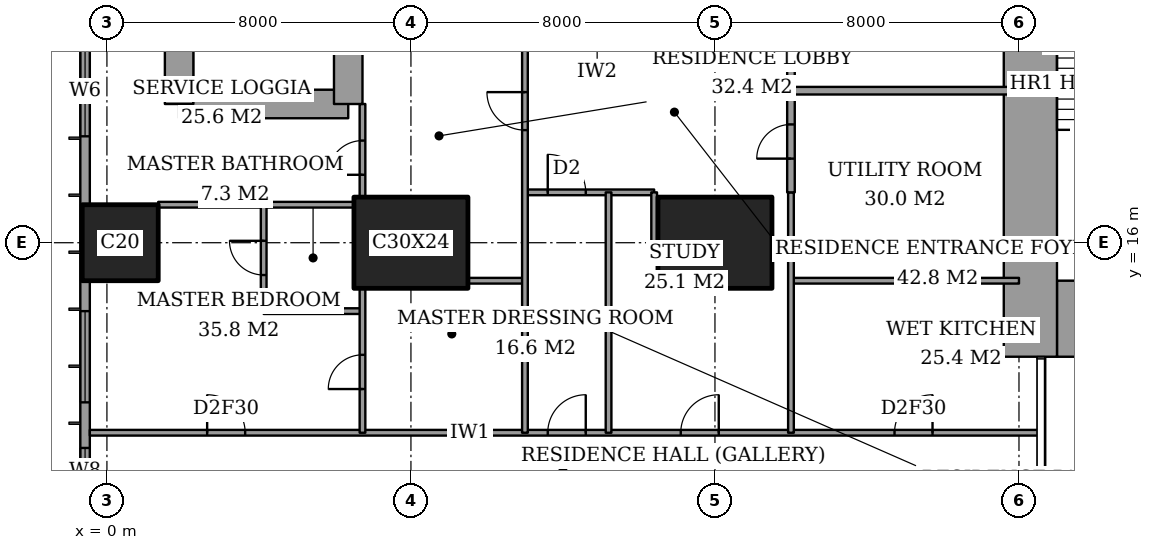
"""IFC4 building model, lengths in metres.
Left out: names, types, materials, properties, quantities, classifications, styles, units other than length and angle.
Written with IfcOpenShell. Run it as: python <this file> out.ifc"""

import sys

from ifc_helpers import new_model, si_unit, direction, frame, frame_2d, origin, origin_2d, place, context, subcontext, project, spatial, rectangle, extrude, element, fill, save


model = new_model("IFC4")
c1 = context("Model", 3, precision=1e-05, world=origin(), true_north=direction((0.0, 1.0)))
c2 = subcontext(c1, "Body", "Model", "MODEL_VIEW")
j1 = project(units=[si_unit("LENGTHUNIT", "METRE"), si_unit("PLANEANGLEUNIT", "RADIAN")], contexts=[c1])
p1 = place(None, origin())
s1 = spatial("IfcSite", under=j1, at=p1, CompositionType="ELEMENT")
p2 = place(p1, origin())
s2 = spatial("IfcBuilding", under=s1, at=p2, CompositionType="ELEMENT")
p3 = place(p2, frame((0.0, 0.0, 72.8)))
s3 = spatial("IfcBuildingStorey", under=s2, at=p3, CompositionType="ELEMENT", Elevation=72.8)
p4 = place(p3, frame((0.35, 16.0, 0.0), z_axis=(0.0, 0.0, 1.0), x_axis=(1.0, 0.0, 0.0)))
e1 = element("IfcColumn", 1, at=p4, inside=s3, PredefinedType="COLUMN", context=c2, shape_type="SweptSolid", body=[
    extrude(rectangle(XDim=2.0, YDim=2.0, at=origin_2d()), origin(), (0.0, 0.0, 1.0), 3.6),
])
for number, where, z_axis, x_axis in (
    (2, (8.0, 16.0, 0.0), (0.0, 0.0, 1.0), (1.0, 0.0, 0.0)),
    (3, (16.0, 16.0, 0.0), (0.0, 0.0, 1.0), (1.0, 0.0, 0.0)),
):
    element("IfcColumn", number, at=place(p3, frame(where, z_axis=z_axis, x_axis=x_axis)), inside=s3, PredefinedType="COLUMN", context=c2, shape_type="SweptSolid", body=[
        extrude(rectangle(XDim=3.0, YDim=2.4, at=origin_2d()), origin(), (0.0, 0.0, 1.0), 3.6),
    ])
p5 = place(p3, frame((25.0, 14.0, 0.0), z_axis=(0.0, 0.0, 1.0), x_axis=(1.0, 0.0, 0.0)))
e4 = element("IfcWall", 4, at=p5, inside=s3, PredefinedType="SHEAR", context=c2, shape_type="SweptSolid", body=[
    extrude(rectangle(XDim=3.15, YDim=2.0, at=frame_2d((1.575, 0.0))), origin(), (0.0, 0.0, 1.0), 3.6),
])
p6 = place(p3, frame((24.3, 13.0, 0.0), z_axis=(0.0, 0.0, 1.0), x_axis=(0.0, 1.0, 0.0)))
e5 = element("IfcWall", 5, at=p6, inside=s3, PredefinedType="SHEAR", context=c2, shape_type="SweptSolid", body=[
    extrude(rectangle(XDim=10.15, YDim=1.4, at=frame_2d((5.075, 0.0))), origin(), (0.0, 0.0, 1.0), 3.6),
])
p7 = place(p3, frame((1.9, 19.65, 0.0), z_axis=(0.0, 0.0, 1.0), x_axis=(1.0, 0.0, 0.0)))
e6 = element("IfcWall", 6, at=p7, inside=s3, PredefinedType="SHEAR", context=c2, shape_type="SweptSolid", body=[
    extrude(rectangle(XDim=4.45, YDim=0.75, at=frame_2d((2.225, 0.0))), origin(), (0.0, 0.0, 1.0), 3.6),
])
p8 = place(p3, frame((6.35, 19.65, 0.0), z_axis=(0.0, 0.0, 1.0), x_axis=(0.0, 1.0, 0.0)))
e7 = element("IfcWall", 7, at=p8, inside=s3, PredefinedType="SHEAR", context=c2, shape_type="SweptSolid", body=[
    extrude(rectangle(XDim=8.7, YDim=0.75, at=frame_2d((4.35, 0.0))), origin(), (0.0, 0.0, 1.0), 3.6),
])
p9 = place(p8, frame((6.725, 0.0, 0.0)))
e8 = element("IfcOpeningElement", 8, at=p9, cuts=e7, PredefinedType="OPENING", context=c2, shape_type="SweptSolid", body=[
    extrude(rectangle(XDim=1.0, YDim=2.1, at=frame_2d((0.5, 1.05))), frame((0.0, 0.385, 0.0), z_axis=(0.0, -1.0, 0.0), x_axis=(1.0, 0.0, 0.0)), (0.0, 0.0, 1.0), 0.77),
])
p10 = place(p3, frame((1.9, 28.35, 0.0), z_axis=(0.0, 0.0, 1.0), x_axis=(0.0, -1.0, 0.0)))
e9 = element("IfcWall", 9, at=p10, inside=s3, PredefinedType="SHEAR", context=c2, shape_type="SweptSolid", body=[
    extrude(rectangle(XDim=8.7, YDim=0.75, at=frame_2d((4.35, 0.0))), origin(), (0.0, 0.0, 1.0), 3.6),
])
p11 = place(p3, frame((-0.575, 44.825, 0.0), z_axis=(0.0, 0.0, 1.0), x_axis=(0.0, -1.0, 0.0)))
e10 = element("IfcWall", 10, at=p11, inside=s3, PredefinedType="SOLIDWALL", context=c2, shape_type="SweptSolid", body=[
    extrude(rectangle(XDim=41.65, YDim=0.25, at=frame_2d((20.825, 0.0))), origin(), (0.0, 0.0, 1.0), 3.6),
])
p12 = place(p11, frame((0.775, 0.0, 0.6)))
e11 = element("IfcOpeningElement", 11, at=p12, cuts=e10, PredefinedType="OPENING", context=c2, shape_type="SweptSolid", body=[
    extrude(rectangle(XDim=2.4, YDim=2.0, at=frame_2d((1.2, 1.0))), frame((0.0, 0.135, 0.0), z_axis=(0.0, -1.0, 0.0), x_axis=(1.0, 0.0, 0.0)), (0.0, 0.0, 1.0), 0.27),
])
p13 = place(p11, frame((6.1, 0.0, 0.6)))
e12 = element("IfcOpeningElement", 12, at=p13, cuts=e10, PredefinedType="OPENING", context=c2, shape_type="SweptSolid", body=[
    extrude(rectangle(XDim=1.2, YDim=2.0, at=frame_2d((0.6, 1.0))), frame((0.0, 0.135, 0.0), z_axis=(0.0, -1.0, 0.0), x_axis=(1.0, 0.0, 0.0)), (0.0, 0.0, 1.0), 0.27),
])
p14 = place(p11, frame((8.425, 0.0, 0.6)))
e13 = element("IfcOpeningElement", 13, at=p14, cuts=e10, PredefinedType="OPENING", context=c2, shape_type="SweptSolid", body=[
    extrude(rectangle(XDim=2.4, YDim=2.0, at=frame_2d((1.2, 1.0))), frame((0.0, 0.135, 0.0), z_axis=(0.0, -1.0, 0.0), x_axis=(1.0, 0.0, 0.0)), (0.0, 0.0, 1.0), 0.27),
])
p15 = place(p11, frame((15.625, 0.0, 0.6)))
e14 = element("IfcOpeningElement", 14, at=p15, cuts=e10, PredefinedType="OPENING", context=c2, shape_type="SweptSolid", body=[
    extrude(rectangle(XDim=2.4, YDim=2.0, at=frame_2d((1.2, 1.0))), frame((0.0, 0.135, 0.0), z_axis=(0.0, -1.0, 0.0), x_axis=(1.0, 0.0, 0.0)), (0.0, 0.0, 1.0), 0.27),
])
p16 = place(p11, frame((23.625, 0.0, 0.6)))
e15 = element("IfcOpeningElement", 15, at=p16, cuts=e10, PredefinedType="OPENING", context=c2, shape_type="SweptSolid", body=[
    extrude(rectangle(XDim=2.4, YDim=2.0, at=frame_2d((1.2, 1.0))), frame((0.0, 0.135, 0.0), z_axis=(0.0, -1.0, 0.0), x_axis=(1.0, 0.0, 0.0)), (0.0, 0.0, 1.0), 0.27),
])
p17 = place(p11, frame((30.625, 0.0, 0.6)))
e16 = element("IfcOpeningElement", 16, at=p17, cuts=e10, PredefinedType="OPENING", context=c2, shape_type="SweptSolid", body=[
    extrude(rectangle(XDim=2.4, YDim=2.0, at=frame_2d((1.2, 1.0))), frame((0.0, 0.135, 0.0), z_axis=(0.0, -1.0, 0.0), x_axis=(1.0, 0.0, 0.0)), (0.0, 0.0, 1.0), 0.27),
])
p18 = place(p11, frame((34.225, 0.0, 0.6)))
e17 = element("IfcOpeningElement", 17, at=p18, cuts=e10, PredefinedType="OPENING", context=c2, shape_type="SweptSolid", body=[
    extrude(rectangle(XDim=1.2, YDim=2.0, at=frame_2d((0.6, 1.0))), frame((0.0, 0.135, 0.0), z_axis=(0.0, -1.0, 0.0), x_axis=(1.0, 0.0, 0.0)), (0.0, 0.0, 1.0), 0.27),
])
p19 = place(p11, frame((38.475, 0.0, 0.6)))
e18 = element("IfcOpeningElement", 18, at=p19, cuts=e10, PredefinedType="OPENING", context=c2, shape_type="SweptSolid", body=[
    extrude(rectangle(XDim=2.4, YDim=2.0, at=frame_2d((1.2, 1.0))), frame((0.0, 0.135, 0.0), z_axis=(0.0, -1.0, 0.0), x_axis=(1.0, 0.0, 0.0)), (0.0, 0.0, 1.0), 0.27),
])
p20 = place(p3, frame((-0.45, 11.0, 0.0), z_axis=(0.0, 0.0, 1.0), x_axis=(1.0, 0.0, 0.0)))
e19 = element("IfcWall", 19, at=p20, inside=s3, PredefinedType="PARTITIONING", context=c2, shape_type="SweptSolid", body=[
    extrude(rectangle(XDim=25.011, YDim=0.15, at=frame_2d((12.505, 0.0))), origin(), (0.0, 0.0, 1.0), 3.35),
])
p21 = place(p20, frame((12.05, 0.0, 0.0)))
e20 = element("IfcOpeningElement", 20, at=p21, cuts=e19, PredefinedType="OPENING", context=c2, shape_type="SweptSolid", body=[
    extrude(rectangle(XDim=1.0, YDim=2.1, at=frame_2d((0.5, 1.05))), frame((0.0, 0.085, 0.0), z_axis=(0.0, -1.0, 0.0), x_axis=(1.0, 0.0, 0.0)), (0.0, 0.0, 1.0), 0.17),
])
p22 = place(p20, frame((3.087, 0.0, 0.0)))
e21 = element("IfcOpeningElement", 21, at=p22, cuts=e19, PredefinedType="OPENING", context=c2, shape_type="SweptSolid", body=[
    extrude(rectangle(XDim=1.0, YDim=2.1, at=frame_2d((0.5, 1.05))), frame((0.0, 0.085, 0.0), z_axis=(0.0, -1.0, 0.0), x_axis=(1.0, 0.0, 0.0)), (0.0, 0.0, 1.0), 0.17),
])
p23 = place(p20, frame((15.55, 0.0, 0.0)))
e22 = element("IfcOpeningElement", 22, at=p23, cuts=e19, PredefinedType="OPENING", context=c2, shape_type="SweptSolid", body=[
    extrude(rectangle(XDim=1.0, YDim=2.1, at=frame_2d((0.5, 1.05))), frame((0.0, 0.085, 0.0), z_axis=(0.0, -1.0, 0.0), x_axis=(1.0, 0.0, 0.0)), (0.0, 0.0, 1.0), 0.17),
])
p24 = place(p20, frame((21.175, 0.0, 0.0)))
e23 = element("IfcOpeningElement", 23, at=p24, cuts=e19, PredefinedType="OPENING", context=c2, shape_type="SweptSolid", body=[
    extrude(rectangle(XDim=1.0, YDim=2.1, at=frame_2d((0.5, 1.05))), frame((0.0, 0.085, 0.0), z_axis=(0.0, -1.0, 0.0), x_axis=(1.0, 0.0, 0.0)), (0.0, 0.0, 1.0), 0.17),
])
p25 = place(p3, frame((4.125, 14.2, 0.0), z_axis=(0.0, 0.0, 1.0), x_axis=(1.0, 0.0, 0.0)))
e24 = element("IfcWall", 24, at=p25, inside=s3, PredefinedType="PARTITIONING", context=c2, shape_type="SweptSolid", body=[
    extrude(rectangle(XDim=2.6, YDim=0.15, at=frame_2d((1.3, 0.0))), origin(), (0.0, 0.0, 1.0), 3.35),
])
p26 = place(p3, frame((9.5, 15.0, 0.0), z_axis=(0.0, 0.0, 1.0), x_axis=(1.0, 0.0, 0.0)))
e25 = element("IfcWall", 25, at=p26, inside=s3, PredefinedType="PARTITIONING", context=c2, shape_type="SweptSolid", body=[
    extrude(rectangle(XDim=1.5, YDim=0.15, at=frame_2d((0.75, 0.0))), origin(), (0.0, 0.0, 1.0), 3.35),
])
p27 = place(p3, frame((18.0, 15.0, 0.0), z_axis=(0.0, 0.0, 1.0), x_axis=(1.0, 0.0, 0.0)))
e26 = element("IfcWall", 26, at=p27, inside=s3, PredefinedType="PARTITIONING", context=c2, shape_type="SweptSolid", body=[
    extrude(rectangle(XDim=6.0, YDim=0.15, at=frame_2d((3.0, 0.0))), origin(), (0.0, 0.0, 1.0), 3.35),
])
p28 = place(p3, frame((17.5, 15.875, 0.0), z_axis=(0.0, 0.0, 1.0), x_axis=(1.0, 0.0, 0.0)))
e27 = element("IfcWall", 27, at=p28, inside=s3, PredefinedType="PARTITIONING", context=c2, shape_type="SweptSolid", body=[
    extrude(rectangle(XDim=0.5, YDim=0.15, at=frame_2d((0.25, 0.0))), origin(), (0.0, 0.0, 1.0), 2.634),
])
p29 = place(p3, frame((1.35, 17.0, 0.0), z_axis=(0.0, 0.0, 1.0), x_axis=(1.0, 0.0, 0.0)))
e28 = element("IfcWall", 28, at=p29, inside=s3, PredefinedType="PARTITIONING", context=c2, shape_type="SweptSolid", body=[
    extrude(rectangle(XDim=5.15, YDim=0.15, at=frame_2d((2.575, 0.0))), origin(), (0.0, 0.0, 1.0), 3.35),
])
p30 = place(p3, frame((11.0, 17.325, 0.0), z_axis=(0.0, 0.0, 1.0), x_axis=(1.0, 0.0, 0.0)))
e29 = element("IfcWall", 29, at=p30, inside=s3, PredefinedType="PARTITIONING", context=c2, shape_type="SweptSolid", body=[
    extrude(rectangle(XDim=3.4, YDim=0.15, at=frame_2d((1.7, 0.0))), origin(), (0.0, 0.0, 1.0), 3.35),
])
p31 = place(p30, frame((0.6, 0.0, 0.0)))
e30 = element("IfcOpeningElement", 30, at=p31, cuts=e29, PredefinedType="OPENING", context=c2, shape_type="SweptSolid", body=[
    extrude(rectangle(XDim=1.0, YDim=2.1, at=frame_2d((0.5, 1.05))), frame((0.0, 0.085, 0.0), z_axis=(0.0, -1.0, 0.0), x_axis=(1.0, 0.0, 0.0)), (0.0, 0.0, 1.0), 0.17),
])
p32 = place(p3, frame((18.0, 20.0, 0.0), z_axis=(0.0, 0.0, 1.0), x_axis=(1.0, 0.0, 0.0)))
e31 = element("IfcWall", 31, at=p32, inside=s3, PredefinedType="PARTITIONING", context=c2, shape_type="SweptSolid", body=[
    extrude(rectangle(XDim=6.0, YDim=0.2, at=frame_2d((3.0, 0.0))), origin(), (0.0, 0.0, 1.0), 3.35),
])
p33 = place(p3, frame((4.125, 14.2, 0.0), z_axis=(0.0, 0.0, 1.0), x_axis=(0.0, 1.0, 0.0)))
e32 = element("IfcWall", 32, at=p33, inside=s3, PredefinedType="PARTITIONING", context=c2, shape_type="SweptSolid", body=[
    extrude(rectangle(XDim=2.8, YDim=0.15, at=frame_2d((1.4, 0.0))), origin(), (0.0, 0.0, 1.0), 3.35),
])
p34 = place(p33, frame((0.95, 0.0, 0.0)))
e33 = element("IfcOpeningElement", 33, at=p34, cuts=e32, PredefinedType="OPENING", context=c2, shape_type="SweptSolid", body=[
    extrude(rectangle(XDim=0.9, YDim=2.1, at=frame_2d((0.45, 1.05))), frame((0.0, 0.085, 0.0), z_axis=(0.0, -1.0, 0.0), x_axis=(1.0, 0.0, 0.0)), (0.0, 0.0, 1.0), 0.17),
])
p35 = place(p3, frame((6.725, 11.0, 0.0), z_axis=(0.0, 0.0, 1.0), x_axis=(0.0, 1.0, 0.0)))
e34 = element("IfcWall", 34, at=p35, inside=s3, PredefinedType="PARTITIONING", context=c2, shape_type="SweptSolid", body=[
    extrude(rectangle(XDim=3.8, YDim=0.15, at=frame_2d((1.9, 0.0))), origin(), (0.0, 0.0, 1.0), 3.35),
])
p36 = place(p35, frame((1.15, 0.0, 0.0)))
e35 = element("IfcOpeningElement", 35, at=p36, cuts=e34, PredefinedType="OPENING", context=c2, shape_type="SweptSolid", body=[
    extrude(rectangle(XDim=0.9, YDim=2.1, at=frame_2d((0.45, 1.05))), frame((0.0, 0.085, 0.0), z_axis=(0.0, -1.0, 0.0), x_axis=(1.0, 0.0, 0.0)), (0.0, 0.0, 1.0), 0.17),
])
p37 = place(p3, frame((6.725, 17.2, 0.0), z_axis=(0.0, 0.0, 1.0), x_axis=(0.0, 1.0, 0.0)))
e36 = element("IfcWall", 36, at=p37, inside=s3, PredefinedType="PARTITIONING", context=c2, shape_type="SweptSolid", body=[
    extrude(rectangle(XDim=2.45, YDim=0.15, at=frame_2d((1.225, 0.0))), origin(), (0.0, 0.0, 1.0), 3.35),
])
p38 = place(p37, frame((0.587, 0.0, 0.0)))
e37 = element("IfcOpeningElement", 37, at=p38, cuts=e36, PredefinedType="OPENING", context=c2, shape_type="SweptSolid", body=[
    extrude(rectangle(XDim=0.9, YDim=2.1, at=frame_2d((0.45, 1.05))), frame((0.0, 0.085, 0.0), z_axis=(0.0, -1.0, 0.0), x_axis=(1.0, 0.0, 0.0)), (0.0, 0.0, 1.0), 0.17),
])
p39 = place(p3, frame((11.0, 11.0, 0.0), z_axis=(0.0, 0.0, 1.0), x_axis=(0.0, 1.0, 0.0)))
e38 = element("IfcWall", 38, at=p39, inside=s3, PredefinedType="PARTITIONING", context=c2, shape_type="SweptSolid", body=[
    extrude(rectangle(XDim=10.6, YDim=0.15, at=frame_2d((5.3, 0.0))), origin(), (0.0, 0.0, 1.0), 3.35),
])
p40 = place(p39, frame((7.962, 0.0, 0.0)))
e39 = element("IfcOpeningElement", 39, at=p40, cuts=e38, PredefinedType="OPENING", context=c2, shape_type="SweptSolid", body=[
    extrude(rectangle(XDim=1.0, YDim=2.1, at=frame_2d((0.5, 1.05))), frame((0.0, 0.085, 0.0), z_axis=(0.0, -1.0, 0.0), x_axis=(1.0, 0.0, 0.0)), (0.0, 0.0, 1.0), 0.17),
])
p41 = place(p3, frame((13.2, 11.0, 0.0), z_axis=(0.0, 0.0, 1.0), x_axis=(0.0, 1.0, 0.0)))
e40 = element("IfcWall", 40, at=p41, inside=s3, PredefinedType="PARTITIONING", context=c2, shape_type="SweptSolid", body=[
    extrude(rectangle(XDim=6.325, YDim=0.15, at=frame_2d((3.163, 0.0))), origin(), (0.0, 0.0, 1.0), 3.35),
])
p42 = place(p3, frame((14.4, 15.875, 0.0), z_axis=(0.0, 0.0, 1.0), x_axis=(0.0, 1.0, 0.0)))
e41 = element("IfcWall", 41, at=p42, inside=s3, PredefinedType="PARTITIONING", context=c2, shape_type="SweptSolid", body=[
    extrude(rectangle(XDim=1.45, YDim=0.15, at=frame_2d((0.725, 0.0))), origin(), (0.0, 0.0, 1.0), 3.35),
])
p43 = place(p3, frame((18.0, 17.325, 0.0), z_axis=(0.0, 0.0, 1.0), x_axis=(0.0, 1.0, 0.0)))
e42 = element("IfcWall", 42, at=p43, inside=s3, PredefinedType="PARTITIONING", context=c2, shape_type="SweptSolid", body=[
    extrude(rectangle(XDim=6.675, YDim=0.2, at=frame_2d((3.337, 0.0))), origin(), (0.0, 0.0, 1.0), 3.35),
])
p44 = place(p43, frame((4.075, 0.0, 0.0)))
e43 = element("IfcOpeningElement", 43, at=p44, cuts=e42, PredefinedType="OPENING", context=c2, shape_type="SweptSolid", body=[
    extrude(rectangle(XDim=1.2, YDim=2.4, at=frame_2d((0.6, 1.2))), frame((0.0, 0.11, 0.0), z_axis=(0.0, -1.0, 0.0), x_axis=(1.0, 0.0, 0.0)), (0.0, 0.0, 1.0), 0.22),
])
p45 = place(p43, frame((0.887, 0.0, 0.0)))
e44 = element("IfcOpeningElement", 44, at=p45, cuts=e42, PredefinedType="OPENING", context=c2, shape_type="SweptSolid", body=[
    extrude(rectangle(XDim=0.9, YDim=2.1, at=frame_2d((0.45, 1.05))), frame((0.0, 0.11, 0.0), z_axis=(0.0, -1.0, 0.0), x_axis=(1.0, 0.0, 0.0)), (0.0, 0.0, 1.0), 0.22),
])
p46 = place(p3, frame((18.0, 11.0, 0.0), z_axis=(0.0, 0.0, 1.0), x_axis=(0.0, 1.0, 0.0)))
e45 = element("IfcWall", 45, at=p46, inside=s3, PredefinedType="PARTITIONING", context=c2, shape_type="SweptSolid", body=[
    extrude(rectangle(XDim=6.325, YDim=0.15, at=frame_2d((3.163, 0.0))), origin(), (0.0, 0.0, 1.0), 3.35),
])
p47 = place(p16, origin())
e46 = element("IfcWindow", 46, at=p47, inside=s3, PartitioningType="SINGLE_PANEL", PredefinedType="WINDOW", context=c2, shape_type="SweptSolid", body=[
    extrude(rectangle(XDim=2.4, YDim=2.0, at=frame_2d((1.2, 1.0))), frame((0.0, 0.03, 0.0), z_axis=(0.0, -1.0, 0.0), x_axis=(1.0, 0.0, 0.0)), (0.0, 0.0, 1.0), 0.06),
])
fill(e15, e46)
p48 = place(p17, origin())
e47 = element("IfcWindow", 47, at=p48, inside=s3, PartitioningType="SINGLE_PANEL", PredefinedType="WINDOW", context=c2, shape_type="SweptSolid", body=[
    extrude(rectangle(XDim=2.4, YDim=2.0, at=frame_2d((1.2, 1.0))), frame((0.0, 0.03, 0.0), z_axis=(0.0, -1.0, 0.0), x_axis=(1.0, 0.0, 0.0)), (0.0, 0.0, 1.0), 0.06),
])
fill(e16, e47)
p49 = place(p18, origin())
e48 = element("IfcWindow", 48, at=p49, inside=s3, PartitioningType="SINGLE_PANEL", PredefinedType="WINDOW", context=c2, shape_type="SweptSolid", body=[
    extrude(rectangle(XDim=1.2, YDim=2.0, at=frame_2d((0.6, 1.0))), frame((0.0, 0.03, 0.0), z_axis=(0.0, -1.0, 0.0), x_axis=(1.0, 0.0, 0.0)), (0.0, 0.0, 1.0), 0.06),
])
fill(e17, e48)
p50 = place(p21, origin())
e49 = element("IfcDoor", 49, at=p50, inside=s3, OperationType="SINGLE_SWING_LEFT", PredefinedType="DOOR", context=c2, shape_type="SweptSolid", body=[
    extrude(rectangle(XDim=1.0, YDim=2.1, at=frame_2d((0.5, 1.05))), frame((0.0, 0.025, 0.0), z_axis=(0.0, -1.0, 0.0), x_axis=(1.0, 0.0, 0.0)), (0.0, 0.0, 1.0), 0.05),
])
fill(e20, e49)
p51 = place(p34, origin())
e50 = element("IfcDoor", 50, at=p51, inside=s3, OperationType="SINGLE_SWING_LEFT", PredefinedType="DOOR", context=c2, shape_type="SweptSolid", body=[
    extrude(rectangle(XDim=0.9, YDim=2.1, at=frame_2d((0.45, 1.05))), frame((0.0, 0.025, 0.0), z_axis=(0.0, -1.0, 0.0), x_axis=(1.0, 0.0, 0.0)), (0.0, 0.0, 1.0), 0.05),
])
fill(e33, e50)
p52 = place(p22, origin())
e51 = element("IfcDoor", 51, at=p52, inside=s3, OperationType="SINGLE_SWING_RIGHT", PredefinedType="DOOR", context=c2, shape_type="SweptSolid", body=[
    extrude(rectangle(XDim=1.0, YDim=2.1, at=frame_2d((0.5, 1.05))), frame((0.0, 0.025, 0.0), z_axis=(0.0, -1.0, 0.0), x_axis=(1.0, 0.0, 0.0)), (0.0, 0.0, 1.0), 0.05),
])
fill(e21, e51)
p53 = place(p38, origin())
e52 = element("IfcDoor", 52, at=p53, inside=s3, OperationType="SINGLE_SWING_RIGHT", PredefinedType="DOOR", context=c2, shape_type="SweptSolid", body=[
    extrude(rectangle(XDim=0.9, YDim=2.1, at=frame_2d((0.45, 1.05))), frame((0.0, 0.025, 0.0), z_axis=(0.0, -1.0, 0.0), x_axis=(1.0, 0.0, 0.0)), (0.0, 0.0, 1.0), 0.05),
])
fill(e37, e52)
p54 = place(p36, origin())
e53 = element("IfcDoor", 53, at=p54, inside=s3, OperationType="SINGLE_SWING_RIGHT", PredefinedType="DOOR", context=c2, shape_type="SweptSolid", body=[
    extrude(rectangle(XDim=0.9, YDim=2.1, at=frame_2d((0.45, 1.05))), frame((0.0, 0.025, 0.0), z_axis=(0.0, -1.0, 0.0), x_axis=(1.0, 0.0, 0.0)), (0.0, 0.0, 1.0), 0.05),
])
fill(e35, e53)
p55 = place(p40, origin())
e54 = element("IfcDoor", 54, at=p55, inside=s3, OperationType="SINGLE_SWING_LEFT", PredefinedType="DOOR", context=c2, shape_type="SweptSolid", body=[
    extrude(rectangle(XDim=1.0, YDim=2.1, at=frame_2d((0.5, 1.05))), frame((0.0, 0.025, 0.0), z_axis=(0.0, -1.0, 0.0), x_axis=(1.0, 0.0, 0.0)), (0.0, 0.0, 1.0), 0.05),
])
fill(e39, e54)
p56 = place(p31, origin())
e55 = element("IfcDoor", 55, at=p56, inside=s3, OperationType="SINGLE_SWING_RIGHT", PredefinedType="DOOR", context=c2, shape_type="SweptSolid", body=[
    extrude(rectangle(XDim=1.0, YDim=2.1, at=frame_2d((0.5, 1.05))), frame((0.0, 0.025, 0.0), z_axis=(0.0, -1.0, 0.0), x_axis=(1.0, 0.0, 0.0)), (0.0, 0.0, 1.0), 0.05),
])
fill(e30, e55)
p57 = place(p23, origin())
e56 = element("IfcDoor", 56, at=p57, inside=s3, OperationType="SINGLE_SWING_LEFT", PredefinedType="DOOR", context=c2, shape_type="SweptSolid", body=[
    extrude(rectangle(XDim=1.0, YDim=2.1, at=frame_2d((0.5, 1.05))), frame((0.0, 0.025, 0.0), z_axis=(0.0, -1.0, 0.0), x_axis=(1.0, 0.0, 0.0)), (0.0, 0.0, 1.0), 0.05),
])
fill(e22, e56)
p58 = place(p24, origin())
e57 = element("IfcDoor", 57, at=p58, inside=s3, OperationType="SINGLE_SWING_LEFT", PredefinedType="DOOR", context=c2, shape_type="SweptSolid", body=[
    extrude(rectangle(XDim=1.0, YDim=2.1, at=frame_2d((0.5, 1.05))), frame((0.0, 0.025, 0.0), z_axis=(0.0, -1.0, 0.0), x_axis=(1.0, 0.0, 0.0)), (0.0, 0.0, 1.0), 0.05),
])
fill(e23, e57)
p59 = place(p45, origin())
e58 = element("IfcDoor", 58, at=p59, inside=s3, OperationType="SINGLE_SWING_RIGHT", PredefinedType="DOOR", context=c2, shape_type="SweptSolid", body=[
    extrude(rectangle(XDim=0.9, YDim=2.1, at=frame_2d((0.45, 1.05))), frame((0.0, 0.025, 0.0), z_axis=(0.0, -1.0, 0.0), x_axis=(1.0, 0.0, 0.0)), (0.0, 0.0, 1.0), 0.05),
])
fill(e44, e58)
save(model, sys.argv[1])
